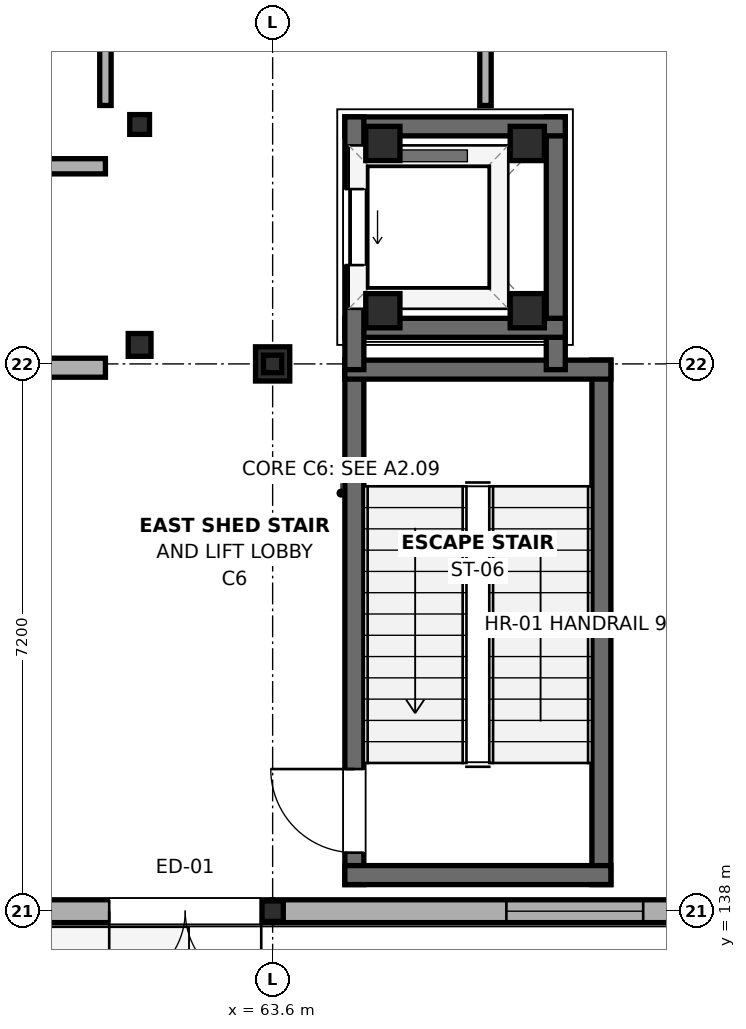
"""IFC4 building model, lengths in metres.
Left out: names, types, materials, properties, quantities, classifications, styles, units other than length and angle.
Written with IfcOpenShell. Run it as: python <this file> out.ifc"""

import sys

from ifc_helpers import new_model, si_unit, direction, frame, frame_2d, origin, origin_2d, place, context, subcontext, project, spatial, rectangle, i_section, extrude, element, fill, save


model = new_model("IFC4")
c1 = context("Model", 3, precision=1e-05, world=origin(), true_north=direction((0.0, 1.0)))
c2 = subcontext(c1, "Body", "Model", "MODEL_VIEW")
j1 = project(units=[si_unit("LENGTHUNIT", "METRE"), si_unit("PLANEANGLEUNIT", "RADIAN")], contexts=[c1])
p1 = place(None, origin())
s1 = spatial("IfcSite", under=j1, at=p1, CompositionType="ELEMENT")
p2 = place(p1, origin())
s2 = spatial("IfcBuilding", under=s1, at=p2, CompositionType="ELEMENT")
p3 = place(p2, origin())
s3 = spatial("IfcBuildingStorey", under=s2, at=p3, CompositionType="ELEMENT", Elevation=0.0)
for number, where, z_axis, x_axis in (
    (1, (65.05, 145.9, -2.15), (0.0, 0.0, 1.0), (1.0, 0.0, 0.0)),
    (2, (66.95, 145.9, -2.15), (0.0, 0.0, 1.0), (1.0, 0.0, 0.0)),
    (3, (65.05, 148.1, -2.15), (0.0, 0.0, 1.0), (1.0, 0.0, 0.0)),
    (4, (66.95, 148.1, -2.15), (0.0, 0.0, 1.0), (1.0, 0.0, 0.0)),
):
    element("IfcColumn", number, at=place(p3, frame(where, z_axis=z_axis, x_axis=x_axis)), inside=s3, PredefinedType="COLUMN", context=c2, shape_type="SweptSolid", body=[
        extrude(rectangle(XDim=0.45, YDim=0.45, at=origin_2d()), origin(), (0.0, 0.0, 1.0), 0.3),
    ])
p4 = place(p3, frame((63.6, 145.2, -2.15), z_axis=(0.0, 0.0, 1.0), x_axis=(1.0, 0.0, 0.0)))
e5 = element("IfcColumn", 5, at=p4, inside=s3, PredefinedType="COLUMN", context=c2, shape_type="SweptSolid", body=[
    extrude(rectangle(XDim=0.45, YDim=0.45, at=origin_2d()), origin(), (0.0, 0.0, 1.0), 1.87),
])
p5 = place(p3, frame((61.85, 145.45, 0.0), z_axis=(0.0, 0.0, 1.0), x_axis=(1.0, 0.0, 0.0)))
e6 = element("IfcColumn", 6, at=p5, inside=s3, PredefinedType="COLUMN", context=c2, shape_type="SweptSolid", body=[
    extrude(i_section(OverallWidth=0.3, OverallDepth=0.3, WebThickness=0.011, FlangeThickness=0.019, FilletRadius=0.027, at=origin_2d()), origin(), (0.0, 0.0, 1.0), 4.56),
])
p6 = place(p3, frame((61.85, 148.35, 0.0), z_axis=(0.0, 0.0, 1.0), x_axis=(1.0, 0.0, 0.0)))
e7 = element("IfcColumn", 7, at=p6, inside=s3, PredefinedType="COLUMN", context=c2, shape_type="SweptSolid", body=[
    extrude(i_section(OverallWidth=0.26, OverallDepth=0.26, WebThickness=0.01, FlangeThickness=0.018, FilletRadius=0.024, at=origin_2d()), origin(), (0.0, 0.0, 1.0), 4.56),
])
p7 = place(p3, frame((63.6, 138.0, 0.0), z_axis=(0.0, 0.0, 1.0), x_axis=(1.0, 0.0, 0.0)))
e8 = element("IfcColumn", 8, at=p7, inside=s3, PredefinedType="COLUMN", context=c2, shape_type="SweptSolid", body=[
    extrude(i_section(OverallWidth=0.28, OverallDepth=0.27, WebThickness=0.008, FlangeThickness=0.013, FilletRadius=0.024, at=origin_2d()), origin(), (0.0, 0.0, 1.0), 4.56),
])
p8 = place(p3, frame((63.6, 145.2, 0.0), z_axis=(0.0, 0.0, 1.0), x_axis=(1.0, 0.0, 0.0)))
e9 = element("IfcColumn", 9, at=p8, inside=s3, PredefinedType="COLUMN", context=c2, shape_type="SweptSolid", body=[
    extrude(i_section(OverallWidth=0.24, OverallDepth=0.23, WebThickness=0.008, FlangeThickness=0.012, FilletRadius=0.021, at=origin_2d()), origin(), (0.0, 0.0, 1.0), 4.56),
])
p9 = place(p3, frame((60.0, 138.0, 0.0), z_axis=(0.0, 0.0, 1.0), x_axis=(1.0, 0.0, 0.0)))
e10 = element("IfcWall", 10, at=p9, inside=s3, PredefinedType="SOLIDWALL", context=c2, shape_type="SweptSolid", body=[
    extrude(rectangle(XDim=3.6, YDim=0.3, at=frame_2d((1.8, 0.0))), origin(), (0.0, 0.0, 1.0), 3.955),
])
p10 = place(p9, frame((1.45, 0.0, 0.0)))
e11 = element("IfcOpeningElement", 11, at=p10, cuts=e10, PredefinedType="OPENING", context=c2, shape_type="SweptSolid", body=[
    extrude(rectangle(XDim=2.0, YDim=2.25, at=frame_2d((1.0, 1.125))), frame((0.0, 0.165, 0.0), z_axis=(0.0, -1.0, 0.0), x_axis=(1.0, 0.0, 0.0)), (0.0, 0.0, 1.0), 0.33),
])
p11 = place(p3, frame((63.6, 138.0, 0.0), z_axis=(0.0, 0.0, 1.0), x_axis=(1.0, 0.0, 0.0)))
e12 = element("IfcWall", 12, at=p11, inside=s3, PredefinedType="SOLIDWALL", context=c2, shape_type="SweptSolid", body=[
    extrude(rectangle(XDim=7.95, YDim=0.3, at=frame_2d((3.975, 0.0))), origin(), (0.0, 0.0, 1.0), 3.955),
])
p12 = place(p11, frame((3.075, 0.0, 2.15)))
e13 = element("IfcOpeningElement", 13, at=p12, cuts=e12, PredefinedType="OPENING", context=c2, shape_type="SweptSolid", body=[
    extrude(rectangle(XDim=1.8, YDim=1.2, at=frame_2d((0.9, 0.6))), frame((0.0, 0.165, 0.0), z_axis=(0.0, -1.0, 0.0), x_axis=(1.0, 0.0, 0.0)), (0.0, 0.0, 1.0), 0.33),
])
p13 = place(p3, frame((64.675, 138.35, 0.0), z_axis=(0.0, 0.0, 1.0), x_axis=(0.0, 1.0, 0.0)))
e14 = element("IfcWall", 14, at=p13, inside=s3, PredefinedType="SHEAR", context=c2, shape_type="SweptSolid", body=[
    extrude(rectangle(XDim=6.9, YDim=0.25, at=frame_2d((3.45, 0.0))), origin(), (0.0, 0.0, 1.0), 4.56),
])
p14 = place(p13, frame((0.42, 0.0, 0.0)))
e15 = element("IfcOpeningElement", 15, at=p14, cuts=e14, PredefinedType="OPENING", context=c2, shape_type="SweptSolid", body=[
    extrude(rectangle(XDim=1.1, YDim=2.15, at=frame_2d((0.55, 1.075))), frame((0.0, 0.14, 0.0), z_axis=(0.0, -1.0, 0.0), x_axis=(1.0, 0.0, 0.0)), (0.0, 0.0, 1.0), 0.28),
])
p15 = place(p3, frame((67.925, 138.35, 0.0), z_axis=(0.0, 0.0, 1.0), x_axis=(0.0, 1.0, 0.0)))
e16 = element("IfcWall", 16, at=p15, inside=s3, PredefinedType="SHEAR", context=c2, shape_type="SweptSolid", body=[
    extrude(rectangle(XDim=6.9, YDim=0.25, at=frame_2d((3.45, 0.0))), origin(), (0.0, 0.0, 1.0), 4.56),
])
for number, where, z_axis, x_axis in (
    (17, (64.55, 138.475, 0.0), (0.0, 0.0, 1.0), (1.0, 0.0, 0.0)),
    (18, (64.55, 145.125, 0.0), (0.0, 0.0, 1.0), (1.0, 0.0, 0.0)),
):
    element("IfcWall", number, at=place(p3, frame(where, z_axis=z_axis, x_axis=x_axis)), inside=s3, PredefinedType="SHEAR", context=c2, shape_type="SweptSolid", body=[
        extrude(rectangle(XDim=3.5, YDim=0.25, at=frame_2d((1.75, 0.0))), origin(), (0.0, 0.0, 1.0), 4.56),
    ])
p16 = place(p3, frame((67.325, 145.125, -1.4), z_axis=(0.0, 0.0, 1.0), x_axis=(0.0, 1.0, 0.0)))
e19 = element("IfcWall", 19, at=p16, inside=s3, PredefinedType="SHEAR", context=c2, shape_type="SweptSolid", body=[
    extrude(rectangle(XDim=3.325, YDim=0.25, at=frame_2d((1.663, 0.0))), origin(), (0.0, 0.0, 1.0), 5.96),
])
for number, where, z_axis, x_axis in (
    (20, (64.55, 145.675, -1.4), (0.0, 0.0, 1.0), (1.0, 0.0, 0.0)),
    (21, (64.55, 148.325, -1.4), (0.0, 0.0, 1.0), (1.0, 0.0, 0.0)),
):
    element("IfcWall", number, at=place(p3, frame(where, z_axis=z_axis, x_axis=x_axis)), inside=s3, PredefinedType="SHEAR", context=c2, shape_type="SweptSolid", body=[
        extrude(rectangle(XDim=2.9, YDim=0.25, at=frame_2d((1.45, 0.0))), origin(), (0.0, 0.0, 1.0), 5.96),
    ])
p17 = place(p3, frame((64.675, 145.125, -1.4), z_axis=(0.0, 0.0, 1.0), x_axis=(0.0, 1.0, 0.0)))
e22 = element("IfcWall", 22, at=p17, inside=s3, PredefinedType="SHEAR", context=c2, shape_type="SweptSolid", body=[
    extrude(rectangle(XDim=3.325, YDim=0.25, at=frame_2d((1.663, 0.0))), origin(), (0.0, 0.0, 1.0), 5.96),
])
p18 = place(p17, frame((1.375, 0.0, 1.4)))
e23 = element("IfcOpeningElement", 23, at=p18, cuts=e22, PredefinedType="OPENING", context=c2, shape_type="SweptSolid", body=[
    extrude(rectangle(XDim=1.0, YDim=2.15, at=frame_2d((0.5, 1.075))), frame((0.0, 0.14, 0.0), z_axis=(0.0, -1.0, 0.0), x_axis=(1.0, 0.0, 0.0)), (0.0, 0.0, 1.0), 0.28),
])
p19 = place(p3, frame((61.4, 148.6, 0.0), z_axis=(0.0, 0.0, 1.0), x_axis=(0.0, 1.0, 0.0)))
e24 = element("IfcWall", 24, at=p19, inside=s3, PredefinedType="PARTITIONING", context=c2, shape_type="SweptSolid", body=[
    extrude(rectangle(XDim=17.64, YDim=0.15, at=frame_2d((8.82, 0.0))), origin(), (0.0, 0.0, 1.0), 4.555),
])
p20 = place(p19, frame((3.725, 0.0, 0.0)))
e25 = element("IfcOpeningElement", 25, at=p20, cuts=e24, PredefinedType="OPENING", context=c2, shape_type="SweptSolid", body=[
    extrude(rectangle(XDim=0.95, YDim=2.15, at=frame_2d((0.475, 1.075))), frame((0.0, 0.09, 0.0), z_axis=(0.0, -1.0, 0.0), x_axis=(1.0, 0.0, 0.0)), (0.0, 0.0, 1.0), 0.18),
])
p21 = place(p19, frame((13.275, 0.0, 0.0)))
e26 = element("IfcOpeningElement", 26, at=p21, cuts=e24, PredefinedType="OPENING", context=c2, shape_type="SweptSolid", body=[
    extrude(rectangle(XDim=1.05, YDim=2.15, at=frame_2d((0.525, 1.075))), frame((0.0, 0.09, 0.0), z_axis=(0.0, -1.0, 0.0), x_axis=(1.0, 0.0, 0.0)), (0.0, 0.0, 1.0), 0.18),
])
p22 = place(p3, frame((66.4, 148.6, 0.0), z_axis=(0.0, 0.0, 1.0), x_axis=(0.0, 1.0, 0.0)))
e27 = element("IfcWall", 27, at=p22, inside=s3, PredefinedType="PARTITIONING", context=c2, shape_type="SweptSolid", body=[
    extrude(rectangle(XDim=11.0, YDim=0.15, at=frame_2d((5.5, 0.0))), origin(), (0.0, 0.0, 1.0), 4.555),
])
p23 = place(p22, frame((4.725, 0.0, 0.0)))
e28 = element("IfcOpeningElement", 28, at=p23, cuts=e27, PredefinedType="OPENING", context=c2, shape_type="SweptSolid", body=[
    extrude(rectangle(XDim=0.95, YDim=2.15, at=frame_2d((0.475, 1.075))), frame((0.0, 0.09, 0.0), z_axis=(0.0, -1.0, 0.0), x_axis=(1.0, 0.0, 0.0)), (0.0, 0.0, 1.0), 0.18),
])
p24 = place(p22, frame((6.62, 0.0, 0.95)))
e29 = element("IfcOpeningElement", 29, at=p24, cuts=e27, PredefinedType="OPENING", context=c2, shape_type="SweptSolid", body=[
    extrude(rectangle(XDim=2.6, YDim=1.5, at=frame_2d((1.3, 0.75))), frame((0.0, 0.09, 0.0), z_axis=(0.0, -1.0, 0.0), x_axis=(1.0, 0.0, 0.0)), (0.0, 0.0, 1.0), 0.18),
])
p25 = place(p3, frame((33.8, 145.15, 0.0), z_axis=(0.0, 0.0, 1.0), x_axis=(1.0, 0.0, 0.0)))
e30 = element("IfcWall", 30, at=p25, inside=s3, PredefinedType="PARTITIONING", context=c2, shape_type="SweptSolid", body=[
    extrude(rectangle(XDim=27.6, YDim=0.25, at=frame_2d((13.8, 0.0))), origin(), (0.0, 0.0, 1.0), 3.955),
])
p26 = place(p25, frame((8.65, 0.0, 0.0)))
e31 = element("IfcOpeningElement", 31, at=p26, cuts=e30, PredefinedType="OPENING", context=c2, shape_type="SweptSolid", body=[
    extrude(rectangle(XDim=1.5, YDim=2.15, at=frame_2d((0.75, 1.075))), frame((0.0, 0.14, 0.0), z_axis=(0.0, -1.0, 0.0), x_axis=(1.0, 0.0, 0.0)), (0.0, 0.0, 1.0), 0.28),
])
p27 = place(p25, frame((20.65, 0.0, 0.0)))
e32 = element("IfcOpeningElement", 32, at=p27, cuts=e30, PredefinedType="OPENING", context=c2, shape_type="SweptSolid", body=[
    extrude(rectangle(XDim=1.5, YDim=2.15, at=frame_2d((0.75, 1.075))), frame((0.0, 0.14, 0.0), z_axis=(0.0, -1.0, 0.0), x_axis=(1.0, 0.0, 0.0)), (0.0, 0.0, 1.0), 0.28),
])
p28 = place(p3, frame((30.6, 147.8, 0.0), z_axis=(0.0, 0.0, 1.0), x_axis=(1.0, 0.0, 0.0)))
e33 = element("IfcWall", 33, at=p28, inside=s3, PredefinedType="PARTITIONING", context=c2, shape_type="SweptSolid", body=[
    extrude(rectangle(XDim=30.8, YDim=0.2, at=frame_2d((15.4, 0.0))), origin(), (0.0, 0.0, 1.0), 4.555),
])
p29 = place(p28, frame((5.8, 0.0, 0.0)))
e34 = element("IfcOpeningElement", 34, at=p29, cuts=e33, PredefinedType="OPENING", context=c2, shape_type="SweptSolid", body=[
    extrude(rectangle(XDim=1.6, YDim=2.15, at=frame_2d((0.8, 1.075))), frame((0.0, 0.115, 0.0), z_axis=(0.0, -1.0, 0.0), x_axis=(1.0, 0.0, 0.0)), (0.0, 0.0, 1.0), 0.23),
])
p30 = place(p28, frame((23.8, 0.0, 0.0)))
e35 = element("IfcOpeningElement", 35, at=p30, cuts=e33, PredefinedType="OPENING", context=c2, shape_type="SweptSolid", body=[
    extrude(rectangle(XDim=1.6, YDim=2.15, at=frame_2d((0.8, 1.075))), frame((0.0, 0.115, 0.0), z_axis=(0.0, -1.0, 0.0), x_axis=(1.0, 0.0, 0.0)), (0.0, 0.0, 1.0), 0.23),
])
p31 = place(p10, frame((2.0, 0.0, 0.0), z_axis=(0.0, 0.0, 1.0), x_axis=(-1.0, 0.0, 0.0)))
e36 = element("IfcDoor", 36, at=p31, inside=s3, OperationType="DOUBLE_DOOR_SINGLE_SWING", PredefinedType="DOOR", context=c2, shape_type="SweptSolid", body=[
    extrude(rectangle(XDim=2.0, YDim=2.25, at=frame_2d((1.0, 1.125))), frame((0.0, 0.025, 0.0), z_axis=(0.0, -1.0, 0.0), x_axis=(1.0, 0.0, 0.0)), (0.0, 0.0, 1.0), 0.05),
])
fill(e11, e36)
p32 = place(p12, origin())
e37 = element("IfcWindow", 37, at=p32, inside=s3, PartitioningType="SINGLE_PANEL", PredefinedType="WINDOW", context=c2, shape_type="SweptSolid", body=[
    extrude(rectangle(XDim=1.8, YDim=1.2, at=frame_2d((0.9, 0.6))), frame((0.0, 0.03, 0.0), z_axis=(0.0, -1.0, 0.0), x_axis=(1.0, 0.0, 0.0)), (0.0, 0.0, 1.0), 0.06),
])
fill(e13, e37)
p33 = place(p14, origin())
e38 = element("IfcDoor", 38, at=p33, inside=s3, OperationType="SINGLE_SWING_RIGHT", PredefinedType="DOOR", context=c2, shape_type="SweptSolid", body=[
    extrude(rectangle(XDim=1.1, YDim=2.15, at=frame_2d((0.55, 1.075))), frame((0.0, 0.025, 0.0), z_axis=(0.0, -1.0, 0.0), x_axis=(1.0, 0.0, 0.0)), (0.0, 0.0, 1.0), 0.05),
])
fill(e15, e38)
p34 = place(p18, origin())
e39 = element("IfcDoor", 39, at=p34, inside=s3, OperationType="SLIDING_TO_LEFT", PredefinedType="DOOR", context=c2, shape_type="SweptSolid", body=[
    extrude(rectangle(XDim=1.0, YDim=2.15, at=frame_2d((0.5, 1.075))), frame((0.0, 0.025, 0.0), z_axis=(0.0, -1.0, 0.0), x_axis=(1.0, 0.0, 0.0)), (0.0, 0.0, 1.0), 0.05),
])
fill(e23, e39)
save(model, sys.argv[1])
